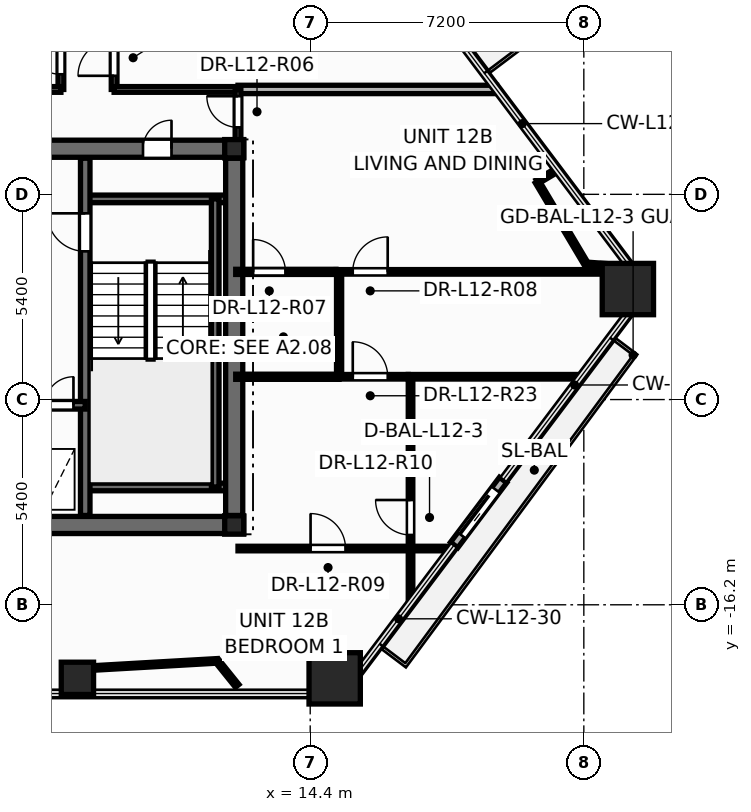
"""IFC4 building model, lengths in metres.
Left out: names, types, materials, properties, quantities, classifications, styles, units other than length and angle.
Written with IfcOpenShell. Run it as: python <this file> out.ifc"""

import sys

from ifc_helpers import new_model, si_unit, direction, frame, frame_2d, origin, origin_2d, place, context, subcontext, project, spatial, rectangle, hollow_rectangle, hollow_circle, i_section, extrude, element, fill, save


model = new_model("IFC4")
c1 = context("Model", 3, precision=1e-05, world=origin(), true_north=direction((0.0, 1.0)))
c2 = subcontext(c1, "Body", "Model", "MODEL_VIEW")
j1 = project(units=[si_unit("LENGTHUNIT", "METRE"), si_unit("PLANEANGLEUNIT", "RADIAN")], contexts=[c1])
p1 = place(None, origin())
s1 = spatial("IfcSite", under=j1, at=p1, CompositionType="ELEMENT")
p2 = place(p1, origin())
s2 = spatial("IfcBuilding", under=s1, at=p2, CompositionType="ELEMENT")
p3 = place(p2, frame((0.0, 0.0, 49.5)))
s3 = spatial("IfcBuildingStorey", under=s2, at=p3, CompositionType="ELEMENT", Elevation=49.5)
for number, where, z_axis, x_axis in (
    (1, (15.044, -18.135, 0.0), (0.0, 0.0, 1.0), (1.0, 0.0, 0.0)),
    (2, (22.759, -7.892, 0.0), (0.0, 0.0, 1.0), (1.0, 0.0, 0.0)),
):
    element("IfcColumn", number, at=place(p3, frame(where, z_axis=z_axis, x_axis=x_axis)), inside=s3, PredefinedType="COLUMN", context=c2, shape_type="SweptSolid", body=[
        extrude(hollow_rectangle(XDim=1.35, YDim=1.35, WallThickness=0.065, at=origin_2d()), origin(), (0.0, 0.0, 1.0), 3.6),
    ])
p4 = place(p3, frame((8.274, -18.135, 0.0), z_axis=(0.0, 0.0, 1.0), x_axis=(1.0, 0.0, 0.0)))
e3 = element("IfcColumn", 3, at=p4, inside=s3, PredefinedType="COLUMN", context=c2, shape_type="SweptSolid", body=[
    extrude(hollow_circle(Radius=0.425, WallThickness=0.038, at=origin_2d()), origin(), (0.0, 0.0, 1.0), 3.6),
])
for number, where, z_axis, x_axis in (
    (4, (12.4, -14.1, 0.0), (0.0, 0.0, 1.0), (1.0, 0.0, 0.0)),
    (5, (12.4, -4.2, 0.0), (0.0, 0.0, 1.0), (1.0, 0.0, 0.0)),
):
    element("IfcColumn", number, at=place(p3, frame(where, z_axis=z_axis, x_axis=x_axis)), inside=s3, PredefinedType="COLUMN", context=c2, shape_type="SweptSolid", body=[
        extrude(i_section(OverallWidth=0.5, OverallDepth=0.482, WebThickness=0.04, FlangeThickness=0.045, at=origin_2d()), origin(), (0.0, 0.0, 1.0), 3.6),
    ])
p5 = place(p3, frame((18.188, -14.626, -0.015), z_axis=(0.0, 0.0, 1.0), x_axis=(0.601623476904, 0.79877981449, 0.0)))
e6 = element("IfcWall", 6, at=p5, inside=s3, PredefinedType="STANDARD", context=c2, shape_type="SweptSolid", body=[
    extrude(rectangle(XDim=2.14, YDim=0.24, at=frame_2d((1.07, 0.0))), origin(), (0.0, 0.0, 1.0), 2.728),
])
p6 = place(p5, frame((0.32, 0.0, 0.015)))
e7 = element("IfcOpeningElement", 7, at=p6, cuts=e6, PredefinedType="OPENING", context=c2, shape_type="SweptSolid", body=[
    extrude(rectangle(XDim=1.506, YDim=2.204, at=frame_2d((0.75, 1.102))), frame((0.0, 0.13, 0.0), z_axis=(0.0, -1.0, 0.0), x_axis=(1.0, 0.0, 0.0)), (0.0, 0.0, 1.0), 0.26),
])
p7 = place(p3, frame((-12.65, -14.1, 0.0), z_axis=(0.0, 0.0, 1.0), x_axis=(1.0, 0.0, 0.0)))
e8 = element("IfcWall", 8, at=p7, inside=s3, PredefinedType="SHEAR", context=c2, shape_type="SweptSolid", body=[
    extrude(rectangle(XDim=25.3, YDim=0.45, at=frame_2d((12.65, 0.0))), origin(), (0.0, 0.0, 1.0), 3.6),
])
p8 = place(p3, frame((-12.65, -4.2, 0.0), z_axis=(0.0, 0.0, 1.0), x_axis=(1.0, 0.0, 0.0)))
e9 = element("IfcWall", 9, at=p8, inside=s3, PredefinedType="SHEAR", context=c2, shape_type="SweptSolid", body=[
    extrude(rectangle(XDim=25.3, YDim=0.45, at=frame_2d((12.65, 0.0))), origin(), (0.0, 0.0, 1.0), 3.6),
])
p9 = place(p8, frame((1.85, 0.0, 0.0)))
e10 = element("IfcOpeningElement", 10, at=p9, cuts=e9, PredefinedType="OPENING", context=c2, shape_type="SweptSolid", body=[
    extrude(rectangle(XDim=0.756, YDim=2.054, at=frame_2d((0.375, 1.027))), frame((0.0, 0.235, 0.0), z_axis=(0.0, -1.0, 0.0), x_axis=(1.0, 0.0, 0.0)), (0.0, 0.0, 1.0), 0.47),
])
p10 = place(p8, frame((22.65, 0.0, 0.0)))
e11 = element("IfcOpeningElement", 11, at=p10, cuts=e9, PredefinedType="OPENING", context=c2, shape_type="SweptSolid", body=[
    extrude(rectangle(XDim=0.756, YDim=2.054, at=frame_2d((0.375, 1.027))), frame((0.0, 0.235, 0.0), z_axis=(0.0, -1.0, 0.0), x_axis=(1.0, 0.0, 0.0)), (0.0, 0.0, 1.0), 0.47),
])
p11 = place(p8, frame((5.85, 0.0, 0.0)))
e12 = element("IfcOpeningElement", 12, at=p11, cuts=e9, PredefinedType="OPENING", context=c2, shape_type="SweptSolid", body=[
    extrude(rectangle(XDim=1.006, YDim=2.104, at=frame_2d((0.5, 1.052))), frame((0.0, 0.235, 0.0), z_axis=(0.0, -1.0, 0.0), x_axis=(1.0, 0.0, 0.0)), (0.0, 0.0, 1.0), 0.47),
])
p12 = place(p8, frame((10.35, 0.0, 0.0)))
e13 = element("IfcOpeningElement", 13, at=p12, cuts=e9, PredefinedType="OPENING", context=c2, shape_type="SweptSolid", body=[
    extrude(rectangle(XDim=1.406, YDim=2.154, at=frame_2d((0.7, 1.077))), frame((0.0, 0.235, 0.0), z_axis=(0.0, -1.0, 0.0), x_axis=(1.0, 0.0, 0.0)), (0.0, 0.0, 1.0), 0.47),
])
p13 = place(p8, frame((18.45, 0.0, 0.0)))
e14 = element("IfcOpeningElement", 14, at=p13, cuts=e9, PredefinedType="OPENING", context=c2, shape_type="SweptSolid", body=[
    extrude(rectangle(XDim=1.006, YDim=2.104, at=frame_2d((0.5, 1.052))), frame((0.0, 0.235, 0.0), z_axis=(0.0, -1.0, 0.0), x_axis=(1.0, 0.0, 0.0)), (0.0, 0.0, 1.0), 0.47),
])
for number, where, z_axis, x_axis in (
    (15, (8.48, -5.52, 0.0), (0.0, 0.0, 1.0), (1.0, 0.0, 0.0)),
    (16, (8.48, -13.1, 0.0), (0.0, 0.0, 1.0), (1.0, 0.0, 0.0)),
):
    element("IfcWall", number, at=place(p3, frame(where, z_axis=z_axis, x_axis=x_axis)), inside=s3, PredefinedType="SOLIDWALL", context=c2, shape_type="SweptSolid", body=[
        extrude(rectangle(XDim=3.87, YDim=0.2, at=frame_2d((1.935, 0.0))), origin(), (0.0, 0.0, 1.0), 3.6),
    ])
p14 = place(p3, frame((11.9, -13.1, 0.0), z_axis=(0.0, 0.0, 1.0), x_axis=(0.0, 1.0, 0.0)))
e17 = element("IfcWall", 17, at=p14, inside=s3, PredefinedType="SOLIDWALL", context=c2, shape_type="SweptSolid", body=[
    extrude(rectangle(XDim=7.58, YDim=0.2, at=frame_2d((3.79, 0.0))), origin(), (0.0, 0.0, 1.0), 3.6),
])
p15 = place(p3, frame((8.48, -13.85, 0.0), z_axis=(0.0, 0.0, 1.0), x_axis=(0.0, 1.0, 0.0)))
e18 = element("IfcWall", 18, at=p15, inside=s3, PredefinedType="SHEAR", context=c2, shape_type="SweptSolid", body=[
    extrude(rectangle(XDim=9.4, YDim=0.25, at=frame_2d((4.7, 0.0))), origin(), (0.0, 0.0, 1.0), 3.6),
])
p16 = place(p15, frame((6.95, 0.0, 0.0)))
e19 = element("IfcOpeningElement", 19, at=p16, cuts=e18, PredefinedType="OPENING", context=c2, shape_type="SweptSolid", body=[
    extrude(rectangle(XDim=1.006, YDim=2.104, at=frame_2d((0.5, 1.052))), frame((0.0, 0.135, 0.0), z_axis=(0.0, -1.0, 0.0), x_axis=(1.0, 0.0, 0.0)), (0.0, 0.0, 1.0), 0.27),
])
p17 = place(p3, frame((5.12, -10.95, 0.0), z_axis=(0.0, 0.0, 1.0), x_axis=(1.0, 0.0, 0.0)))
e20 = element("IfcWall", 20, at=p17, inside=s3, PredefinedType="SOLIDWALL", context=c2, shape_type="SweptSolid", body=[
    extrude(rectangle(XDim=3.36, YDim=0.2, at=frame_2d((1.68, 0.0))), origin(), (0.0, 0.0, 1.0), 3.6),
])
p18 = place(p17, frame((0.42, 0.0, 0.0)))
e21 = element("IfcOpeningElement", 21, at=p18, cuts=e20, PredefinedType="OPENING", context=c2, shape_type="SweptSolid", body=[
    extrude(rectangle(XDim=1.106, YDim=2.104, at=frame_2d((0.55, 1.052))), frame((0.0, 0.11, 0.0), z_axis=(0.0, -1.0, 0.0), x_axis=(1.0, 0.0, 0.0)), (0.0, 0.0, 1.0), 0.22),
])
p19 = place(p17, frame((2.3, 0.0, 0.0)))
e22 = element("IfcOpeningElement", 22, at=p19, cuts=e20, PredefinedType="OPENING", context=c2, shape_type="SweptSolid", body=[
    extrude(rectangle(XDim=0.756, YDim=2.054, at=frame_2d((0.375, 1.027))), frame((0.0, 0.11, 0.0), z_axis=(0.0, -1.0, 0.0), x_axis=(1.0, 0.0, 0.0)), (0.0, 0.0, 1.0), 0.22),
])
p20 = place(p3, frame((12.4, -13.85, 0.0), z_axis=(0.0, 0.0, 1.0), x_axis=(0.0, 1.0, 0.0)))
e23 = element("IfcWall", 23, at=p20, inside=s3, PredefinedType="SHEAR", context=c2, shape_type="SweptSolid", body=[
    extrude(rectangle(XDim=9.4, YDim=0.45, at=frame_2d((4.7, 0.0))), origin(), (0.0, 0.0, 1.0), 3.6),
])
p21 = place(p3, frame((7.84, -2.64, 0.0), z_axis=(0.0, 0.0, 1.0), x_axis=(0.0, 1.0, 0.0)))
e24 = element("IfcWall", 24, at=p21, inside=s3, PredefinedType="PARTITIONING", context=c2, shape_type="SweptSolid", body=[
    extrude(rectangle(XDim=8.84, YDim=0.15, at=frame_2d((4.42, 0.0))), origin(), (0.0, 0.0, 1.0), 2.325),
])
p22 = place(p21, frame((0.399, 0.0, 0.0)))
e25 = element("IfcOpeningElement", 25, at=p22, cuts=e24, PredefinedType="OPENING", context=c2, shape_type="SweptSolid", body=[
    extrude(rectangle(XDim=0.956, YDim=2.104, at=frame_2d((0.475, 1.052))), frame((0.0, 0.085, 0.0), z_axis=(0.0, -1.0, 0.0), x_axis=(1.0, 0.0, 0.0)), (0.0, 0.0, 1.0), 0.17),
])
p23 = place(p3, frame((9.24, -2.64, 0.0), z_axis=(0.0, 0.0, 1.0), x_axis=(0.0, 1.0, 0.0)))
e26 = element("IfcWall", 26, at=p23, inside=s3, PredefinedType="PARTITIONING", context=c2, shape_type="SweptSolid", body=[
    extrude(rectangle(XDim=8.84, YDim=0.15, at=frame_2d((4.42, 0.0))), origin(), (0.0, 0.0, 1.0), 2.325),
])
p24 = place(p23, frame((0.359, 0.0, 0.0)))
e27 = element("IfcOpeningElement", 27, at=p24, cuts=e26, PredefinedType="OPENING", context=c2, shape_type="SweptSolid", body=[
    extrude(rectangle(XDim=0.956, YDim=2.104, at=frame_2d((0.475, 1.052))), frame((0.0, 0.085, 0.0), z_axis=(0.0, -1.0, 0.0), x_axis=(1.0, 0.0, 0.0)), (0.0, 0.0, 1.0), 0.17),
])
p25 = place(p3, frame((15.08, -7.44, 0.0), z_axis=(0.0, 0.0, 1.0), x_axis=(1.0, 0.0, 0.0)))
e28 = element("IfcWall", 28, at=p25, inside=s3, PredefinedType="PARTITIONING", context=c2, shape_type="SweptSolid", body=[
    extrude(rectangle(XDim=7.839, YDim=0.12, at=frame_2d((3.919, 0.0))), origin(), (0.0, 0.0, 1.0), 2.325),
])
p26 = place(p25, frame((0.439, 0.0, 0.0)))
e29 = element("IfcOpeningElement", 29, at=p26, cuts=e28, PredefinedType="OPENING", context=c2, shape_type="SweptSolid", body=[
    extrude(rectangle(XDim=0.926, YDim=2.104, at=frame_2d((0.46, 1.052))), frame((0.0, 0.07, 0.0), z_axis=(0.0, -1.0, 0.0), x_axis=(1.0, 0.0, 0.0)), (0.0, 0.0, 1.0), 0.14),
])
p27 = place(p3, frame((12.5, -2.64, 0.0), z_axis=(0.0, 0.0, 1.0), x_axis=(1.0, 0.0, 0.0)))
e30 = element("IfcWall", 30, at=p27, inside=s3, PredefinedType="PARTITIONING", context=c2, shape_type="SweptSolid", body=[
    extrude(rectangle(XDim=6.804, YDim=0.22, at=frame_2d((3.402, 0.0))), origin(), (0.0, 0.0, 1.0), 2.713),
])
p28 = place(p3, frame((17.04, -16.15, 0.0), z_axis=(0.0, 0.0, 1.0), x_axis=(0.0, 1.0, 0.0)))
e31 = element("IfcWall", 31, at=p28, inside=s3, PredefinedType="PARTITIONING", context=c2, shape_type="SweptSolid", body=[
    extrude(rectangle(XDim=5.95, YDim=0.12, at=frame_2d((2.975, 0.0))), origin(), (0.0, 0.0, 1.0), 2.713),
])
p29 = place(p28, frame((1.788, 0.0, 0.0)))
e32 = element("IfcOpeningElement", 32, at=p29, cuts=e31, PredefinedType="OPENING", context=c2, shape_type="SweptSolid", body=[
    extrude(rectangle(XDim=0.926, YDim=2.104, at=frame_2d((0.46, 1.052))), frame((0.0, 0.07, 0.0), z_axis=(0.0, -1.0, 0.0), x_axis=(1.0, 0.0, 0.0)), (0.0, 0.0, 1.0), 0.14),
])
p30 = place(p3, frame((12.5, -14.72, 0.0), z_axis=(0.0, 0.0, 1.0), x_axis=(1.0, 0.0, 0.0)))
e33 = element("IfcWall", 33, at=p30, inside=s3, PredefinedType="PARTITIONING", context=c2, shape_type="SweptSolid", body=[
    extrude(rectangle(XDim=5.617, YDim=0.12, at=frame_2d((2.809, 0.0))), origin(), (0.0, 0.0, 1.0), 2.325),
])
p31 = place(p30, frame((1.909, 0.0, 0.0)))
e34 = element("IfcOpeningElement", 34, at=p31, cuts=e33, PredefinedType="OPENING", context=c2, shape_type="SweptSolid", body=[
    extrude(rectangle(XDim=0.926, YDim=2.104, at=frame_2d((0.46, 1.052))), frame((0.0, 0.07, 0.0), z_axis=(0.0, -1.0, 0.0), x_axis=(1.0, 0.0, 0.0)), (0.0, 0.0, 1.0), 0.14),
])
p32 = place(p3, frame((-0.138, -2.64, 0.0), z_axis=(0.0, 0.0, 1.0), x_axis=(1.0, 0.0, 0.0)))
e35 = element("IfcWall", 35, at=p32, inside=s3, PredefinedType="PARTITIONING", context=c2, shape_type="SweptSolid", body=[
    extrude(rectangle(XDim=7.978, YDim=0.15, at=frame_2d((3.989, 0.0))), origin(), (0.0, 0.0, 1.0), 2.325),
])
p33 = place(p3, frame((16.98, -10.2, 0.0), z_axis=(0.0, 0.0, 1.0), x_axis=(1.0, 0.0, 0.0)))
e36 = element("IfcWall", 36, at=p33, inside=s3, PredefinedType="PARTITIONING", context=c2, shape_type="SweptSolid", body=[
    extrude(rectangle(XDim=4.542, YDim=0.12, at=frame_2d((2.271, 0.0))), origin(), (0.0, 0.0, 1.0), 2.713),
])
p34 = place(p3, frame((8.154, -17.893, 0.0), z_axis=(0.0, 0.0, 1.0), x_axis=(0.998357508525, 0.057291231189, 0.0)))
e37 = element("IfcWall", 37, at=p34, inside=s3, PredefinedType="PARTITIONING", context=c2, shape_type="SweptSolid", body=[
    extrude(rectangle(XDim=3.801, YDim=0.12, at=frame_2d((1.901, 0.0))), origin(), (0.0, 0.0, 1.0), 2.325),
])
p35 = place(p3, frame((9.24, -2.64, 0.0), z_axis=(0.0, 0.0, 1.0), x_axis=(1.0, 0.0, 0.0)))
e38 = element("IfcWall", 38, at=p35, inside=s3, PredefinedType="PARTITIONING", context=c2, shape_type="SweptSolid", body=[
    extrude(rectangle(XDim=3.26, YDim=0.15, at=frame_2d((1.63, 0.0))), origin(), (0.0, 0.0, 1.0), 3.35),
])
p36 = place(p3, frame((12.44, -7.44, 0.0), z_axis=(0.0, 0.0, 1.0), x_axis=(1.0, 0.0, 0.0)))
e39 = element("IfcWall", 39, at=p36, inside=s3, PredefinedType="PARTITIONING", context=c2, shape_type="SweptSolid", body=[
    extrude(rectangle(XDim=2.638, YDim=0.135, at=frame_2d((1.319, 0.0))), origin(), (0.0, 0.0, 1.0), 2.713),
])
p37 = place(p36, frame((0.458, 0.0, 0.0)))
e40 = element("IfcOpeningElement", 40, at=p37, cuts=e39, PredefinedType="OPENING", context=c2, shape_type="SweptSolid", body=[
    extrude(rectangle(XDim=0.856, YDim=2.104, at=frame_2d((0.425, 1.052))), frame((0.0, 0.078, 0.0), z_axis=(0.0, -1.0, 0.0), x_axis=(1.0, 0.0, 0.0)), (0.0, 0.0, 1.0), 0.155),
])
p38 = place(p3, frame((15.16, -10.2, 0.0), z_axis=(0.0, 0.0, 1.0), x_axis=(0.0, 1.0, 0.0)))
e41 = element("IfcWall", 41, at=p38, inside=s3, PredefinedType="PARTITIONING", context=c2, shape_type="SweptSolid", body=[
    extrude(rectangle(XDim=2.76, YDim=0.135, at=frame_2d((1.38, 0.0))), origin(), (0.0, 0.0, 1.0), 3.35),
])
p39 = place(p3, frame((12.44, -10.2, 0.0), z_axis=(0.0, 0.0, 1.0), x_axis=(1.0, 0.0, 0.0)))
e42 = element("IfcWall", 42, at=p39, inside=s3, PredefinedType="PARTITIONING", context=c2, shape_type="SweptSolid", body=[
    extrude(rectangle(XDim=2.72, YDim=0.135, at=frame_2d((1.36, 0.0))), origin(), (0.0, 0.0, 1.0), 2.713),
])
p40 = place(p3, frame((21.667, -7.243, 0.0), z_axis=(0.0, 0.0, 1.0), x_axis=(-0.511270035884, 0.859420124507, 0.0)))
e43 = element("IfcWall", 43, at=p40, inside=s3, PredefinedType="PARTITIONING", context=c2, shape_type="SweptSolid", body=[
    extrude(rectangle(XDim=2.529, YDim=0.12, at=frame_2d((1.265, 0.0))), origin(), (0.0, 0.0, 1.0), 2.325),
])
p41 = place(p3, frame((15.16, -10.2, 0.0), z_axis=(0.0, 0.0, 1.0), x_axis=(1.0, 0.0, 0.0)))
e44 = element("IfcWall", 44, at=p41, inside=s3, PredefinedType="PARTITIONING", context=c2, shape_type="SweptSolid", body=[
    extrude(rectangle(XDim=1.818, YDim=0.12, at=frame_2d((0.909, 0.0))), origin(), (0.0, 0.0, 1.0), 3.35),
])
p42 = place(p41, frame((0.36, 0.0, 0.0)))
e45 = element("IfcOpeningElement", 45, at=p42, cuts=e44, PredefinedType="OPENING", context=c2, shape_type="SweptSolid", body=[
    extrude(rectangle(XDim=0.926, YDim=2.104, at=frame_2d((0.46, 1.052))), frame((0.0, 0.07, 0.0), z_axis=(0.0, -1.0, 0.0), x_axis=(1.0, 0.0, 0.0)), (0.0, 0.0, 1.0), 0.14),
])
p43 = place(p3, frame((12.5, -4.24, 0.0), z_axis=(0.0, 0.0, 1.0), x_axis=(0.0, 1.0, 0.0)))
e46 = element("IfcWall", 46, at=p43, inside=s3, PredefinedType="PARTITIONING", context=c2, shape_type="SweptSolid", body=[
    extrude(rectangle(XDim=1.6, YDim=0.15, at=frame_2d((0.8, 0.0))), origin(), (0.0, 0.0, 1.0), 2.325),
])
p44 = place(p43, frame((0.602, 0.0, 0.0)))
e47 = element("IfcOpeningElement", 47, at=p44, cuts=e46, PredefinedType="OPENING", context=c2, shape_type="SweptSolid", body=[
    extrude(rectangle(XDim=0.826, YDim=2.104, at=frame_2d((0.41, 1.052))), frame((0.0, 0.085, 0.0), z_axis=(0.0, -1.0, 0.0), x_axis=(1.0, 0.0, 0.0)), (0.0, 0.0, 1.0), 0.17),
])
p45 = place(p3, frame((11.949, -17.676, 0.0), z_axis=(0.0, 0.0, 1.0), x_axis=(0.626701436355, -0.779259462356, 0.0)))
e48 = element("IfcWall", 48, at=p45, inside=s3, PredefinedType="PARTITIONING", context=c2, shape_type="SweptSolid", body=[
    extrude(rectangle(XDim=0.845, YDim=0.12, at=frame_2d((0.422, 0.0))), origin(), (0.0, 0.0, 1.0), 2.713),
])
p46 = place(p3, frame((22.51, -7.303, 0.0), z_axis=(0.0, 0.0, 1.0), x_axis=(-0.997468959841, 0.071103264016, 0.0)))
e49 = element("IfcWall", 49, at=p46, inside=s3, PredefinedType="PARTITIONING", context=c2, shape_type="SweptSolid", body=[
    extrude(rectangle(XDim=0.845, YDim=0.12, at=frame_2d((0.422, 0.0))), origin(), (0.0, 0.0, 1.0), 2.325),
])
p47 = place(p3, frame((8.19, -18.526, 0.0), z_axis=(0.0, 0.0, 1.0), x_axis=(-0.057049790539, 0.998371334424, 0.0)))
e50 = element("IfcWall", 50, at=p47, inside=s3, PredefinedType="PARTITIONING", context=c2, shape_type="SweptSolid", body=[
    extrude(rectangle(XDim=0.633, YDim=0.12, at=frame_2d((0.317, 0.0))), origin(), (0.0, 0.0, 1.0), 2.325),
])
p48 = place(p3, frame((20.374, -5.069, 0.0), z_axis=(0.0, 0.0, 1.0), x_axis=(0.859424801122, 0.511262174638, 0.0)))
e51 = element("IfcWall", 51, at=p48, inside=s3, PredefinedType="PARTITIONING", context=c2, shape_type="SweptSolid", body=[
    extrude(rectangle(XDim=0.6, YDim=0.12, at=frame_2d((0.3, 0.0))), origin(), (0.0, 0.0, 1.0), 2.713),
])
p49 = place(p6, origin())
e52 = element("IfcDoor", 52, at=p49, inside=s3, OperationType="SLIDING_TO_RIGHT", PredefinedType="DOOR", context=c2, shape_type="SweptSolid", body=[
    extrude(rectangle(XDim=1.5, YDim=2.2, at=frame_2d((0.75, 1.1))), frame((0.0, 0.025, 0.0), z_axis=(0.0, -1.0, 0.0), x_axis=(1.0, 0.0, 0.0)), (0.0, 0.0, 1.0), 0.05),
])
fill(e7, e52)
p50 = place(p16, origin())
e53 = element("IfcDoor", 53, at=p50, inside=s3, OperationType="SINGLE_SWING_RIGHT", PredefinedType="DOOR", context=c2, shape_type="SweptSolid", body=[
    extrude(rectangle(XDim=1.0, YDim=2.1, at=frame_2d((0.5, 1.05))), frame((0.0, 0.025, 0.0), z_axis=(0.0, -1.0, 0.0), x_axis=(1.0, 0.0, 0.0)), (0.0, 0.0, 1.0), 0.05),
])
fill(e19, e53)
p51 = place(p19, origin())
e54 = element("IfcDoor", 54, at=p51, inside=s3, OperationType="SINGLE_SWING_RIGHT", PredefinedType="DOOR", context=c2, shape_type="SweptSolid", body=[
    extrude(rectangle(XDim=0.75, YDim=2.05, at=frame_2d((0.375, 1.025))), frame((0.0, 0.025, 0.0), z_axis=(0.0, -1.0, 0.0), x_axis=(1.0, 0.0, 0.0)), (0.0, 0.0, 1.0), 0.05),
])
fill(e22, e54)
p52 = place(p10, origin())
e55 = element("IfcDoor", 55, at=p52, inside=s3, OperationType="SINGLE_SWING_RIGHT", PredefinedType="DOOR", context=c2, shape_type="SweptSolid", body=[
    extrude(rectangle(XDim=0.75, YDim=2.05, at=frame_2d((0.375, 1.025))), frame((0.0, 0.025, 0.0), z_axis=(0.0, -1.0, 0.0), x_axis=(1.0, 0.0, 0.0)), (0.0, 0.0, 1.0), 0.05),
])
fill(e11, e55)
p53 = place(p44, origin())
e56 = element("IfcDoor", 56, at=p53, inside=s3, OperationType="SINGLE_SWING_RIGHT", PredefinedType="DOOR", context=c2, shape_type="SweptSolid", body=[
    extrude(rectangle(XDim=0.82, YDim=2.1, at=frame_2d((0.41, 1.05))), frame((0.0, 0.025, 0.0), z_axis=(0.0, -1.0, 0.0), x_axis=(1.0, 0.0, 0.0)), (0.0, 0.0, 1.0), 0.05),
])
fill(e47, e56)
p54 = place(p37, origin())
e57 = element("IfcDoor", 57, at=p54, inside=s3, OperationType="SINGLE_SWING_LEFT", PredefinedType="DOOR", context=c2, shape_type="SweptSolid", body=[
    extrude(rectangle(XDim=0.85, YDim=2.1, at=frame_2d((0.425, 1.05))), frame((0.0, 0.025, 0.0), z_axis=(0.0, -1.0, 0.0), x_axis=(1.0, 0.0, 0.0)), (0.0, 0.0, 1.0), 0.05),
])
fill(e40, e57)
p55 = place(p26, origin())
e58 = element("IfcDoor", 58, at=p55, inside=s3, OperationType="SINGLE_SWING_RIGHT", PredefinedType="DOOR", context=c2, shape_type="SweptSolid", body=[
    extrude(rectangle(XDim=0.92, YDim=2.1, at=frame_2d((0.46, 1.05))), frame((0.0, 0.025, 0.0), z_axis=(0.0, -1.0, 0.0), x_axis=(1.0, 0.0, 0.0)), (0.0, 0.0, 1.0), 0.05),
])
fill(e29, e58)
p56 = place(p31, origin())
e59 = element("IfcDoor", 59, at=p56, inside=s3, OperationType="SINGLE_SWING_LEFT", PredefinedType="DOOR", context=c2, shape_type="SweptSolid", body=[
    extrude(rectangle(XDim=0.92, YDim=2.1, at=frame_2d((0.46, 1.05))), frame((0.0, 0.025, 0.0), z_axis=(0.0, -1.0, 0.0), x_axis=(1.0, 0.0, 0.0)), (0.0, 0.0, 1.0), 0.05),
])
fill(e34, e59)
p57 = place(p29, origin())
e60 = element("IfcDoor", 60, at=p57, inside=s3, OperationType="SINGLE_SWING_RIGHT", PredefinedType="DOOR", context=c2, shape_type="SweptSolid", body=[
    extrude(rectangle(XDim=0.92, YDim=2.1, at=frame_2d((0.46, 1.05))), frame((0.0, 0.025, 0.0), z_axis=(0.0, -1.0, 0.0), x_axis=(1.0, 0.0, 0.0)), (0.0, 0.0, 1.0), 0.05),
])
fill(e32, e60)
p58 = place(p22, origin())
e61 = element("IfcDoor", 61, at=p58, inside=s3, OperationType="SINGLE_SWING_RIGHT", PredefinedType="DOOR", context=c2, shape_type="SweptSolid", body=[
    extrude(rectangle(XDim=0.95, YDim=2.1, at=frame_2d((0.475, 1.05))), frame((0.0, 0.025, 0.0), z_axis=(0.0, -1.0, 0.0), x_axis=(1.0, 0.0, 0.0)), (0.0, 0.0, 1.0), 0.05),
])
fill(e25, e61)
p59 = place(p24, origin())
e62 = element("IfcDoor", 62, at=p59, inside=s3, OperationType="SINGLE_SWING_LEFT", PredefinedType="DOOR", context=c2, shape_type="SweptSolid", body=[
    extrude(rectangle(XDim=0.95, YDim=2.1, at=frame_2d((0.475, 1.05))), frame((0.0, 0.025, 0.0), z_axis=(0.0, -1.0, 0.0), x_axis=(1.0, 0.0, 0.0)), (0.0, 0.0, 1.0), 0.05),
])
fill(e27, e62)
p60 = place(p42, origin())
e63 = element("IfcDoor", 63, at=p60, inside=s3, OperationType="SINGLE_SWING_LEFT", PredefinedType="DOOR", context=c2, shape_type="SweptSolid", body=[
    extrude(rectangle(XDim=0.92, YDim=2.1, at=frame_2d((0.46, 1.05))), frame((0.0, 0.025, 0.0), z_axis=(0.0, -1.0, 0.0), x_axis=(1.0, 0.0, 0.0)), (0.0, 0.0, 1.0), 0.05),
])
fill(e45, e63)
save(model, sys.argv[1])
